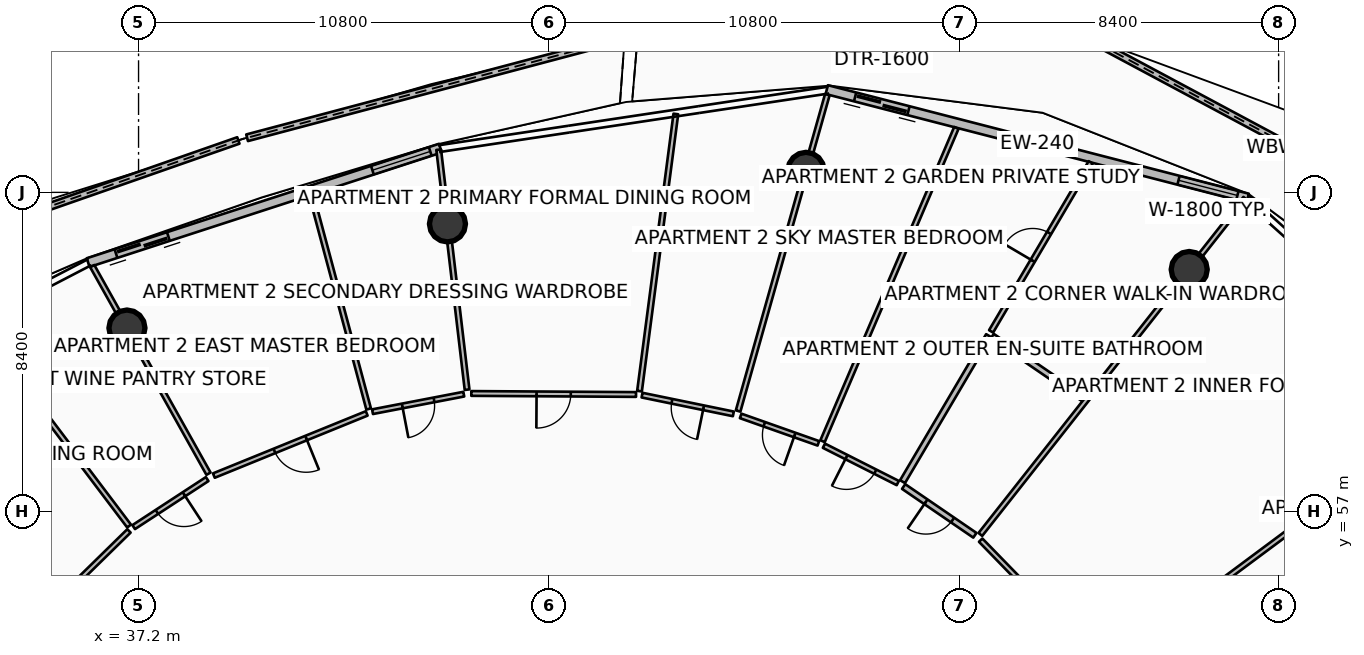
"""IFC4 building model, lengths in metres.
Left out: names, types, materials, properties, quantities, classifications, styles, units other than length and angle.
Written with IfcOpenShell. Run it as: python <this file> out.ifc"""

import sys

from ifc_helpers import new_model, si_unit, direction, frame, frame_2d, origin, origin_2d, place, context, subcontext, project, spatial, polyline, rectangle, circle, outline, extrude, element, fill, save


model = new_model("IFC4")
c1 = context("Model", 3, precision=1e-05, world=origin(), true_north=direction((0.0, 1.0)))
c2 = subcontext(c1, "Body", "Model", "MODEL_VIEW")
j1 = project(units=[si_unit("LENGTHUNIT", "METRE"), si_unit("PLANEANGLEUNIT", "RADIAN")], contexts=[c1])
p1 = place(None, origin())
s1 = spatial("IfcSite", under=j1, at=p1, CompositionType="ELEMENT")
p2 = place(p1, origin())
s2 = spatial("IfcBuilding", under=s1, at=p2, CompositionType="ELEMENT")
p3 = place(p2, frame((0.0, 0.0, 294.45)))
s3 = spatial("IfcBuildingStorey", under=s2, at=p3, CompositionType="ELEMENT", Elevation=294.45)
for number, where, z_axis, x_axis in (
    (1, (64.847, 63.371, 0.0), (0.0, 0.0, 1.0), (1.0, 0.0, 0.0)),
    (2, (54.763, 65.979, 0.0), (0.0, 0.0, 1.0), (1.0, 0.0, 0.0)),
    (3, (45.329, 64.571, 0.0), (0.0, 0.0, 1.0), (1.0, 0.0, 0.0)),
    (4, (36.895, 61.83, 0.0), (0.0, 0.0, 1.0), (1.0, 0.0, 0.0)),
):
    element("IfcColumn", number, at=place(p3, frame(where, z_axis=z_axis, x_axis=x_axis)), inside=s3, PredefinedType="COLUMN", context=c2, shape_type="SweptSolid", body=[
        extrude(circle(Radius=0.475, at=origin_2d()), origin(), (0.0, 0.0, 1.0), 3.59),
    ])
p4 = place(p3, frame((73.038, 63.65, 0.0), z_axis=(0.0, 0.0, 1.0), x_axis=(-0.881580944095, 0.472032879161, 0.0)))
e5 = element("IfcWall", 5, at=p4, inside=s3, PredefinedType="PARAPET", context=c2, shape_type="SweptSolid", body=[
    extrude(outline(polyline([(0.0, 0.0), (12.362, 0.0), (12.362, 1.632), (6.181, 1.798), (0.0, 1.86), (0.0, 0.0)])), frame((0.0, 0.09, 0.0), z_axis=(0.0, -1.0, 0.0), x_axis=(1.0, 0.0, 0.0)), (0.0, 0.0, 1.0), 0.18),
])
p5 = place(p3, frame((49.993, 69.473, 0.0), z_axis=(0.0, 0.0, 1.0), x_axis=(-0.96657188746, -0.256395761219, 0.0)))
e6 = element("IfcWall", 6, at=p5, inside=s3, PredefinedType="PARAPET", context=c2, shape_type="SweptSolid", body=[
    extrude(outline(polyline([(0.0, 0.0), (10.281, 0.0), (10.281, 1.148), (5.14, 1.127), (0.0, 1.224), (0.0, 0.0)])), frame((0.0, 0.09, 0.0), z_axis=(0.0, -1.0, 0.0), x_axis=(1.0, 0.0, 0.0)), (0.0, 0.0, 1.0), 0.18),
])
p6 = place(p3, frame((39.827, 66.766, 0.0), z_axis=(0.0, 0.0, 1.0), x_axis=(-0.944003849273, -0.329934436757, 0.0)))
e7 = element("IfcWall", 7, at=p6, inside=s3, PredefinedType="PARAPET", context=c2, shape_type="SweptSolid", body=[
    extrude(outline(polyline([(0.0, 0.0), (10.406, 0.0), (10.406, 1.483), (5.203, 1.284), (0.0, 1.148), (0.0, 0.0)])), frame((0.0, 0.09, 0.0), z_axis=(0.0, -1.0, 0.0), x_axis=(1.0, 0.0, 0.0)), (0.0, 0.0, 1.0), 0.18),
])
p7 = place(p3, frame((66.386, 65.249, 0.0), z_axis=(0.0, 0.0, 1.0), x_axis=(-0.968343758421, 0.249620442927, 0.0)))
e8 = element("IfcWall", 8, at=p7, inside=s3, PredefinedType="SOLIDWALL", context=c2, shape_type="SweptSolid", body=[
    extrude(rectangle(XDim=11.438, YDim=0.24, at=frame_2d((5.719, 0.0))), origin(), (0.0, 0.0, 1.0), 2.54),
])
p8 = place(p7, frame((9.218, 0.0, 0.0)))
e9 = element("IfcOpeningElement", 9, at=p8, cuts=e8, PredefinedType="OPENING", context=c2, shape_type="SweptSolid", body=[
    extrude(rectangle(XDim=1.45, YDim=2.15, at=frame_2d((0.725, 1.075))), frame((0.0, 0.13, 0.0), z_axis=(0.0, -1.0, 0.0), x_axis=(1.0, 0.0, 0.0)), (0.0, 0.0, 1.0), 0.26),
])
p9 = place(p7, frame((0.28, 0.0, 0.65)))
e10 = element("IfcOpeningElement", 10, at=p9, cuts=e8, PredefinedType="OPENING", context=c2, shape_type="SweptSolid", body=[
    extrude(rectangle(XDim=1.6, YDim=1.5, at=frame_2d((0.8, 0.75))), frame((0.0, 0.13, 0.0), z_axis=(0.0, -1.0, 0.0), x_axis=(1.0, 0.0, 0.0)), (0.0, 0.0, 1.0), 0.26),
])
p10 = place(p3, frame((45.142, 66.564, 0.0), z_axis=(0.0, 0.0, 1.0), x_axis=(-0.951055974609, -0.309018661507, 0.0)))
e11 = element("IfcWall", 11, at=p10, inside=s3, PredefinedType="SOLIDWALL", context=c2, shape_type="SweptSolid", body=[
    extrude(rectangle(XDim=9.745, YDim=0.24, at=frame_2d((4.873, 0.0))), origin(), (0.0, 0.0, 1.0), 2.54),
])
p11 = place(p10, frame((7.525, 0.0, 0.0)))
e12 = element("IfcOpeningElement", 12, at=p11, cuts=e11, PredefinedType="OPENING", context=c2, shape_type="SweptSolid", body=[
    extrude(rectangle(XDim=1.45, YDim=2.15, at=frame_2d((0.725, 1.075))), frame((0.0, 0.13, 0.0), z_axis=(0.0, -1.0, 0.0), x_axis=(1.0, 0.0, 0.0)), (0.0, 0.0, 1.0), 0.26),
])
p12 = place(p10, frame((0.28, 0.0, 0.65)))
e13 = element("IfcOpeningElement", 13, at=p12, cuts=e11, PredefinedType="OPENING", context=c2, shape_type="SweptSolid", body=[
    extrude(rectangle(XDim=1.6, YDim=1.5, at=frame_2d((0.8, 0.75))), frame((0.0, 0.13, 0.0), z_axis=(0.0, -1.0, 0.0), x_axis=(1.0, 0.0, 0.0)), (0.0, 0.0, 1.0), 0.26),
])
p13 = place(p3, frame((63.998, 50.959, 0.0), z_axis=(0.0, 0.0, 1.0), x_axis=(0.872499131003, 0.488615663276, 0.0)))
e14 = element("IfcWall", 14, at=p13, inside=s3, PredefinedType="PARTITIONING", context=c2, shape_type="SweptSolid", body=[
    extrude(rectangle(XDim=12.094, YDim=0.125, at=frame_2d((6.047, 0.0))), origin(), (0.0, 0.0, 1.0), 2.957),
])
p14 = place(p3, frame((62.707, 52.934, 0.0), z_axis=(0.0, 0.0, 1.0), x_axis=(0.802495582548, 0.59665805952, 0.0)))
e15 = element("IfcWall", 15, at=p14, inside=s3, PredefinedType="PARTITIONING", context=c2, shape_type="SweptSolid", body=[
    extrude(rectangle(XDim=11.812, YDim=0.125, at=frame_2d((5.906, 0.0))), origin(), (0.0, 0.0, 1.0), 3.03),
])
p15 = place(p3, frame((62.579, 52.938, 0.0), z_axis=(0.0, 0.0, 1.0), x_axis=(-0.697017998251, 0.717053631268, 0.0)))
e16 = element("IfcWall", 16, at=p15, inside=s3, PredefinedType="PARTITIONING", context=c2, shape_type="SweptSolid", body=[
    extrude(rectangle(XDim=4.618, YDim=0.125, at=frame_2d((2.309, 0.0))), origin(), (0.0, 0.0, 1.0), 2.957),
])
p16 = place(p15, frame((1.859, 0.0, 0.0)))
e17 = element("IfcOpeningElement", 17, at=p16, cuts=e16, PredefinedType="OPENING", context=c2, shape_type="SweptSolid", body=[
    extrude(rectangle(XDim=0.9, YDim=2.08, at=frame_2d((0.45, 1.04))), frame((0.0, 0.073, 0.0), z_axis=(0.0, -1.0, 0.0), x_axis=(1.0, 0.0, 0.0)), (0.0, 0.0, 1.0), 0.145),
])
p17 = place(p3, frame((59.352, 56.399, 0.0), z_axis=(0.0, 0.0, 1.0), x_axis=(0.619083822168, 0.78532491437, 0.0)))
e18 = element("IfcWall", 18, at=p17, inside=s3, PredefinedType="PARTITIONING", context=c2, shape_type="SweptSolid", body=[
    extrude(rectangle(XDim=11.26, YDim=0.125, at=frame_2d((5.63, 0.0))), origin(), (0.0, 0.0, 1.0), 2.957),
])
p18 = place(p3, frame((59.207, 56.377, 0.0), z_axis=(0.0, 0.0, 1.0), x_axis=(-0.825259809451, 0.56475326197, 0.0)))
e19 = element("IfcWall", 19, at=p18, inside=s3, PredefinedType="PARTITIONING", context=c2, shape_type="SweptSolid", body=[
    extrude(rectangle(XDim=2.272, YDim=0.15, at=frame_2d((1.136, 0.0))), origin(), (0.0, 0.0, 1.0), 2.957),
])
p19 = place(p18, frame((0.711, 0.0, 0.0)))
e20 = element("IfcOpeningElement", 20, at=p19, cuts=e19, PredefinedType="OPENING", context=c2, shape_type="SweptSolid", body=[
    extrude(rectangle(XDim=0.85, YDim=2.06, at=frame_2d((0.425, 1.03))), frame((0.0, 0.085, 0.0), z_axis=(0.0, -1.0, 0.0), x_axis=(1.0, 0.0, 0.0)), (0.0, 0.0, 1.0), 0.17),
])
p20 = place(p3, frame((62.049, 59.982, 0.0), z_axis=(0.0, 0.0, 1.0), x_axis=(-0.825298975811, 0.56469602489, 0.0)))
e21 = element("IfcWall", 21, at=p20, inside=s3, PredefinedType="PARTITIONING", context=c2, shape_type="SweptSolid", body=[
    extrude(rectangle(XDim=2.891, YDim=0.15, at=frame_2d((1.446, 0.0))), origin(), (0.0, 0.0, 1.0), 2.957),
])
p21 = place(p3, frame((57.304, 57.789, 0.0), z_axis=(0.0, 0.0, 1.0), x_axis=(0.507661108654, 0.861556845925, 0.0)))
e22 = element("IfcWall", 22, at=p21, inside=s3, PredefinedType="PARTITIONING", context=c2, shape_type="SweptSolid", body=[
    extrude(rectangle(XDim=4.46, YDim=0.15, at=frame_2d((2.23, 0.0))), origin(), (0.0, 0.0, 1.0), 3.03),
])
p22 = place(p3, frame((59.634, 61.743, 0.0), z_axis=(0.0, 0.0, 1.0), x_axis=(0.507642154879, 0.861568013908, 0.0)))
e23 = element("IfcWall", 23, at=p22, inside=s3, PredefinedType="PARTITIONING", context=c2, shape_type="SweptSolid", body=[
    extrude(rectangle(XDim=5.162, YDim=0.125, at=frame_2d((2.581, 0.0))), origin(), (0.0, 0.0, 1.0), 3.03),
])
p23 = place(p22, frame((2.156, 0.0, 0.0)))
e24 = element("IfcOpeningElement", 24, at=p23, cuts=e23, PredefinedType="OPENING", context=c2, shape_type="SweptSolid", body=[
    extrude(rectangle(XDim=0.85, YDim=2.06, at=frame_2d((0.425, 1.03))), frame((0.0, 0.073, 0.0), z_axis=(0.0, -1.0, 0.0), x_axis=(1.0, 0.0, 0.0)), (0.0, 0.0, 1.0), 0.145),
])
p24 = place(p3, frame((55.199, 58.853, 0.0), z_axis=(0.0, 0.0, 1.0), x_axis=(0.392818008104, 0.919616231104, 0.0)))
e25 = element("IfcWall", 25, at=p24, inside=s3, PredefinedType="PARTITIONING", context=c2, shape_type="SweptSolid", body=[
    extrude(rectangle(XDim=8.965, YDim=0.125, at=frame_2d((4.483, 0.0))), origin(), (0.0, 0.0, 1.0), 3.03),
])
p25 = place(p3, frame((57.178, 57.752, 0.0), z_axis=(0.0, 0.0, 1.0), x_axis=(-0.892467562153, 0.451111572125, 0.0)))
e26 = element("IfcWall", 26, at=p25, inside=s3, PredefinedType="PARTITIONING", context=c2, shape_type="SweptSolid", body=[
    extrude(rectangle(XDim=2.177, YDim=0.125, at=frame_2d((1.089, 0.0))), origin(), (0.0, 0.0, 1.0), 3.03),
])
p26 = place(p25, frame((0.664, 0.0, 0.0)))
e27 = element("IfcOpeningElement", 27, at=p26, cuts=e26, PredefinedType="OPENING", context=c2, shape_type="SweptSolid", body=[
    extrude(rectangle(XDim=0.85, YDim=2.06, at=frame_2d((0.425, 1.03))), frame((0.0, 0.073, 0.0), z_axis=(0.0, -1.0, 0.0), x_axis=(1.0, 0.0, 0.0)), (0.0, 0.0, 1.0), 0.145),
])
p27 = place(p3, frame((55.088, 58.797, 0.0), z_axis=(0.0, 0.0, 1.0), x_axis=(-0.942971615288, 0.332873148152, 0.0)))
e28 = element("IfcWall", 28, at=p27, inside=s3, PredefinedType="PARTITIONING", context=c2, shape_type="SweptSolid", body=[
    extrude(rectangle(XDim=2.167, YDim=0.125, at=frame_2d((1.083, 0.0))), origin(), (0.0, 0.0, 1.0), 2.957),
])
p28 = place(p27, frame((0.659, 0.0, 0.0)))
e29 = element("IfcOpeningElement", 29, at=p28, cuts=e28, PredefinedType="OPENING", context=c2, shape_type="SweptSolid", body=[
    extrude(rectangle(XDim=0.85, YDim=2.06, at=frame_2d((0.425, 1.03))), frame((0.0, 0.073, 0.0), z_axis=(0.0, -1.0, 0.0), x_axis=(1.0, 0.0, 0.0)), (0.0, 0.0, 1.0), 0.145),
])
p29 = place(p3, frame((52.977, 59.647, 0.0), z_axis=(0.0, 0.0, 1.0), x_axis=(0.271446085083, 0.96245364714, 0.0)))
e30 = element("IfcWall", 30, at=p29, inside=s3, PredefinedType="PARTITIONING", context=c2, shape_type="SweptSolid", body=[
    extrude(rectangle(XDim=8.649, YDim=0.125, at=frame_2d((4.324, 0.0))), origin(), (0.0, 0.0, 1.0), 2.957),
])
p30 = place(p3, frame((50.383, 60.17, 0.0), z_axis=(0.0, 0.0, 1.0), x_axis=(0.129989099313, 0.991515423006, 0.0)))
e31 = element("IfcWall", 31, at=p30, inside=s3, PredefinedType="PARTITIONING", context=c2, shape_type="SweptSolid", body=[
    extrude(rectangle(XDim=7.355, YDim=0.125, at=frame_2d((3.677, 0.0))), origin(), (0.0, 0.0, 1.0), 3.03),
])
p31 = place(p3, frame((52.852, 59.571, 0.0), z_axis=(0.0, 0.0, 1.0), x_axis=(-0.979521745736, 0.201338395816, 0.0)))
e32 = element("IfcWall", 32, at=p31, inside=s3, PredefinedType="PARTITIONING", context=c2, shape_type="SweptSolid", body=[
    extrude(rectangle(XDim=2.453, YDim=0.125, at=frame_2d((1.227, 0.0))), origin(), (0.0, 0.0, 1.0), 2.957),
])
p32 = place(p31, frame((0.802, 0.0, 0.0)))
e33 = element("IfcOpeningElement", 33, at=p32, cuts=e32, PredefinedType="OPENING", context=c2, shape_type="SweptSolid", body=[
    extrude(rectangle(XDim=0.85, YDim=2.06, at=frame_2d((0.425, 1.03))), frame((0.0, 0.073, 0.0), z_axis=(0.0, -1.0, 0.0), x_axis=(1.0, 0.0, 0.0)), (0.0, 0.0, 1.0), 0.145),
])
p33 = place(p3, frame((50.291, 60.082, 0.0), z_axis=(0.0, 0.0, 1.0), x_axis=(-0.999980453918, 0.006252342161, 0.0)))
e34 = element("IfcWall", 34, at=p33, inside=s3, PredefinedType="PARTITIONING", context=c2, shape_type="SweptSolid", body=[
    extrude(rectangle(XDim=4.334, YDim=0.125, at=frame_2d((2.167, 0.0))), origin(), (0.0, 0.0, 1.0), 3.03),
])
p34 = place(p33, frame((1.717, 0.0, 0.0)))
e35 = element("IfcOpeningElement", 35, at=p34, cuts=e34, PredefinedType="OPENING", context=c2, shape_type="SweptSolid", body=[
    extrude(rectangle(XDim=0.9, YDim=2.08, at=frame_2d((0.45, 1.04))), frame((0.0, 0.073, 0.0), z_axis=(0.0, -1.0, 0.0), x_axis=(1.0, 0.0, 0.0)), (0.0, 0.0, 1.0), 0.145),
])
p35 = place(p3, frame((45.845, 60.209, 0.0), z_axis=(0.0, 0.0, 1.0), x_axis=(-0.117529592268, 0.993069380729, 0.0)))
e36 = element("IfcWall", 36, at=p35, inside=s3, PredefinedType="PARTITIONING", context=c2, shape_type="SweptSolid", body=[
    extrude(rectangle(XDim=6.359, YDim=0.125, at=frame_2d((3.179, 0.0))), origin(), (0.0, 0.0, 1.0), 2.957),
])
p36 = place(p3, frame((43.255, 59.701, 0.0), z_axis=(0.0, 0.0, 1.0), x_axis=(-0.258974129201, 0.965884258286, 0.0)))
e37 = element("IfcWall", 37, at=p36, inside=s3, PredefinedType="PARTITIONING", context=c2, shape_type="SweptSolid", body=[
    extrude(rectangle(XDim=5.827, YDim=0.125, at=frame_2d((2.914, 0.0))), origin(), (0.0, 0.0, 1.0), 3.03),
])
p37 = place(p3, frame((45.758, 60.091, 0.0), z_axis=(0.0, 0.0, 1.0), x_axis=(-0.982023530452, -0.188758537923, 0.0)))
e38 = element("IfcWall", 38, at=p37, inside=s3, PredefinedType="PARTITIONING", context=c2, shape_type="SweptSolid", body=[
    extrude(rectangle(XDim=2.446, YDim=0.125, at=frame_2d((1.223, 0.0))), origin(), (0.0, 0.0, 1.0), 2.957),
])
p38 = place(p37, frame((0.798, 0.0, 0.0)))
e39 = element("IfcOpeningElement", 39, at=p38, cuts=e38, PredefinedType="OPENING", context=c2, shape_type="SweptSolid", body=[
    extrude(rectangle(XDim=0.85, YDim=2.06, at=frame_2d((0.425, 1.03))), frame((0.0, 0.073, 0.0), z_axis=(0.0, -1.0, 0.0), x_axis=(1.0, 0.0, 0.0)), (0.0, 0.0, 1.0), 0.145),
])
p39 = place(p3, frame((43.204, 59.584, 0.0), z_axis=(0.0, 0.0, 1.0), x_axis=(-0.926332321747, -0.376707352843, 0.0)))
e40 = element("IfcWall", 40, at=p39, inside=s3, PredefinedType="PARTITIONING", context=c2, shape_type="SweptSolid", body=[
    extrude(rectangle(XDim=4.342, YDim=0.125, at=frame_2d((2.171, 0.0))), origin(), (0.0, 0.0, 1.0), 2.957),
])
p40 = place(p39, frame((1.721, 0.0, 0.0)))
e41 = element("IfcOpeningElement", 41, at=p40, cuts=e40, PredefinedType="OPENING", context=c2, shape_type="SweptSolid", body=[
    extrude(rectangle(XDim=0.9, YDim=2.08, at=frame_2d((0.45, 1.04))), frame((0.0, 0.073, 0.0), z_axis=(0.0, -1.0, 0.0), x_axis=(1.0, 0.0, 0.0)), (0.0, 0.0, 1.0), 0.145),
])
p41 = place(p3, frame((39.041, 57.998, 0.0), z_axis=(0.0, 0.0, 1.0), x_axis=(-0.488617622803, 0.872498033629, 0.0)))
e42 = element("IfcWall", 42, at=p41, inside=s3, PredefinedType="PARTITIONING", context=c2, shape_type="SweptSolid", body=[
    extrude(rectangle(XDim=6.259, YDim=0.125, at=frame_2d((3.129, 0.0))), origin(), (0.0, 0.0, 1.0), 2.957),
])
p42 = place(p3, frame((36.951, 56.62, 0.0), z_axis=(0.0, 0.0, 1.0), x_axis=(-0.602918531989, 0.797802759951, 0.0)))
e43 = element("IfcWall", 43, at=p42, inside=s3, PredefinedType="PARTITIONING", context=c2, shape_type="SweptSolid", body=[
    extrude(rectangle(XDim=6.71, YDim=0.125, at=frame_2d((3.355, 0.0))), origin(), (0.0, 0.0, 1.0), 3.03),
])
p43 = place(p3, frame((39.006, 57.856, 0.0), z_axis=(0.0, 0.0, 1.0), x_axis=(-0.837071991575, -0.547092753489, 0.0)))
e44 = element("IfcWall", 44, at=p43, inside=s3, PredefinedType="PARTITIONING", context=c2, shape_type="SweptSolid", body=[
    extrude(rectangle(XDim=2.31, YDim=0.125, at=frame_2d((1.155, 0.0))), origin(), (0.0, 0.0, 1.0), 2.957),
])
p44 = place(p43, frame((0.73, 0.0, 0.0)))
e45 = element("IfcOpeningElement", 45, at=p44, cuts=e44, PredefinedType="OPENING", context=c2, shape_type="SweptSolid", body=[
    extrude(rectangle(XDim=0.85, YDim=2.06, at=frame_2d((0.425, 1.03))), frame((0.0, 0.073, 0.0), z_axis=(0.0, -1.0, 0.0), x_axis=(1.0, 0.0, 0.0)), (0.0, 0.0, 1.0), 0.145),
])
p45 = place(p3, frame((36.948, 56.493, 0.0), z_axis=(0.0, 0.0, 1.0), x_axis=(-0.714296261594, -0.69984344726, 0.0)))
e46 = element("IfcWall", 46, at=p45, inside=s3, PredefinedType="PARTITIONING", context=c2, shape_type="SweptSolid", body=[
    extrude(rectangle(XDim=4.477, YDim=0.125, at=frame_2d((2.238, 0.0))), origin(), (0.0, 0.0, 1.0), 2.957),
])
p46 = place(p45, frame((1.788, 0.0, 0.0)))
e47 = element("IfcOpeningElement", 47, at=p46, cuts=e46, PredefinedType="OPENING", context=c2, shape_type="SweptSolid", body=[
    extrude(rectangle(XDim=0.9, YDim=2.08, at=frame_2d((0.45, 1.04))), frame((0.0, 0.073, 0.0), z_axis=(0.0, -1.0, 0.0), x_axis=(1.0, 0.0, 0.0)), (0.0, 0.0, 1.0), 0.145),
])
p47 = place(p8, origin())
e48 = element("IfcDoor", 48, at=p47, inside=s3, OperationType="DOUBLE_DOOR_SLIDING", PredefinedType="DOOR", context=c2, shape_type="SweptSolid", body=[
    extrude(rectangle(XDim=1.45, YDim=2.15, at=frame_2d((0.725, 1.075))), frame((0.0, 0.025, 0.0), z_axis=(0.0, -1.0, 0.0), x_axis=(1.0, 0.0, 0.0)), (0.0, 0.0, 1.0), 0.05),
])
fill(e9, e48)
p48 = place(p9, origin())
e49 = element("IfcWindow", 49, at=p48, inside=s3, PartitioningType="SINGLE_PANEL", PredefinedType="WINDOW", context=c2, shape_type="SweptSolid", body=[
    extrude(rectangle(XDim=1.6, YDim=1.5, at=frame_2d((0.8, 0.75))), frame((0.0, 0.03, 0.0), z_axis=(0.0, -1.0, 0.0), x_axis=(1.0, 0.0, 0.0)), (0.0, 0.0, 1.0), 0.06),
])
fill(e10, e49)
p49 = place(p11, origin())
e50 = element("IfcDoor", 50, at=p49, inside=s3, OperationType="DOUBLE_DOOR_SLIDING", PredefinedType="DOOR", context=c2, shape_type="SweptSolid", body=[
    extrude(rectangle(XDim=1.45, YDim=2.15, at=frame_2d((0.725, 1.075))), frame((0.0, 0.025, 0.0), z_axis=(0.0, -1.0, 0.0), x_axis=(1.0, 0.0, 0.0)), (0.0, 0.0, 1.0), 0.05),
])
fill(e12, e50)
p50 = place(p12, origin())
e51 = element("IfcWindow", 51, at=p50, inside=s3, PartitioningType="SINGLE_PANEL", PredefinedType="WINDOW", context=c2, shape_type="SweptSolid", body=[
    extrude(rectangle(XDim=1.6, YDim=1.5, at=frame_2d((0.8, 0.75))), frame((0.0, 0.03, 0.0), z_axis=(0.0, -1.0, 0.0), x_axis=(1.0, 0.0, 0.0)), (0.0, 0.0, 1.0), 0.06),
])
fill(e13, e51)
p51 = place(p19, origin())
e52 = element("IfcDoor", 52, at=p51, inside=s3, OperationType="SINGLE_SWING_RIGHT", PredefinedType="DOOR", context=c2, shape_type="SweptSolid", body=[
    extrude(rectangle(XDim=0.85, YDim=2.06, at=frame_2d((0.425, 1.03))), frame((0.0, 0.025, 0.0), z_axis=(0.0, -1.0, 0.0), x_axis=(1.0, 0.0, 0.0)), (0.0, 0.0, 1.0), 0.05),
])
fill(e20, e52)
p52 = place(p23, origin())
e53 = element("IfcDoor", 53, at=p52, inside=s3, OperationType="SINGLE_SWING_LEFT", PredefinedType="DOOR", context=c2, shape_type="SweptSolid", body=[
    extrude(rectangle(XDim=0.85, YDim=2.06, at=frame_2d((0.425, 1.03))), frame((0.0, 0.025, 0.0), z_axis=(0.0, -1.0, 0.0), x_axis=(1.0, 0.0, 0.0)), (0.0, 0.0, 1.0), 0.05),
])
fill(e24, e53)
p53 = place(p26, origin())
e54 = element("IfcDoor", 54, at=p53, inside=s3, OperationType="SINGLE_SWING_RIGHT", PredefinedType="DOOR", context=c2, shape_type="SweptSolid", body=[
    extrude(rectangle(XDim=0.85, YDim=2.06, at=frame_2d((0.425, 1.03))), frame((0.0, 0.025, 0.0), z_axis=(0.0, -1.0, 0.0), x_axis=(1.0, 0.0, 0.0)), (0.0, 0.0, 1.0), 0.05),
])
fill(e27, e54)
p54 = place(p28, origin())
e55 = element("IfcDoor", 55, at=p54, inside=s3, OperationType="SINGLE_SWING_LEFT", PredefinedType="DOOR", context=c2, shape_type="SweptSolid", body=[
    extrude(rectangle(XDim=0.85, YDim=2.06, at=frame_2d((0.425, 1.03))), frame((0.0, 0.025, 0.0), z_axis=(0.0, -1.0, 0.0), x_axis=(1.0, 0.0, 0.0)), (0.0, 0.0, 1.0), 0.05),
])
fill(e29, e55)
p55 = place(p32, origin())
e56 = element("IfcDoor", 56, at=p55, inside=s3, OperationType="SINGLE_SWING_LEFT", PredefinedType="DOOR", context=c2, shape_type="SweptSolid", body=[
    extrude(rectangle(XDim=0.85, YDim=2.06, at=frame_2d((0.425, 1.03))), frame((0.0, 0.025, 0.0), z_axis=(0.0, -1.0, 0.0), x_axis=(1.0, 0.0, 0.0)), (0.0, 0.0, 1.0), 0.05),
])
fill(e33, e56)
p56 = place(p34, origin())
e57 = element("IfcDoor", 57, at=p56, inside=s3, OperationType="SINGLE_SWING_RIGHT", PredefinedType="DOOR", context=c2, shape_type="SweptSolid", body=[
    extrude(rectangle(XDim=0.9, YDim=2.08, at=frame_2d((0.45, 1.04))), frame((0.0, 0.025, 0.0), z_axis=(0.0, -1.0, 0.0), x_axis=(1.0, 0.0, 0.0)), (0.0, 0.0, 1.0), 0.05),
])
fill(e35, e57)
p57 = place(p38, origin())
e58 = element("IfcDoor", 58, at=p57, inside=s3, OperationType="SINGLE_SWING_RIGHT", PredefinedType="DOOR", context=c2, shape_type="SweptSolid", body=[
    extrude(rectangle(XDim=0.85, YDim=2.06, at=frame_2d((0.425, 1.03))), frame((0.0, 0.025, 0.0), z_axis=(0.0, -1.0, 0.0), x_axis=(1.0, 0.0, 0.0)), (0.0, 0.0, 1.0), 0.05),
])
fill(e39, e58)
p58 = place(p40, origin())
e59 = element("IfcDoor", 59, at=p58, inside=s3, OperationType="SINGLE_SWING_LEFT", PredefinedType="DOOR", context=c2, shape_type="SweptSolid", body=[
    extrude(rectangle(XDim=0.9, YDim=2.08, at=frame_2d((0.45, 1.04))), frame((0.0, 0.025, 0.0), z_axis=(0.0, -1.0, 0.0), x_axis=(1.0, 0.0, 0.0)), (0.0, 0.0, 1.0), 0.05),
])
fill(e41, e59)
p59 = place(p44, origin())
e60 = element("IfcDoor", 60, at=p59, inside=s3, OperationType="SINGLE_SWING_LEFT", PredefinedType="DOOR", context=c2, shape_type="SweptSolid", body=[
    extrude(rectangle(XDim=0.85, YDim=2.06, at=frame_2d((0.425, 1.03))), frame((0.0, 0.025, 0.0), z_axis=(0.0, -1.0, 0.0), x_axis=(1.0, 0.0, 0.0)), (0.0, 0.0, 1.0), 0.05),
])
fill(e45, e60)
save(model, sys.argv[1])
